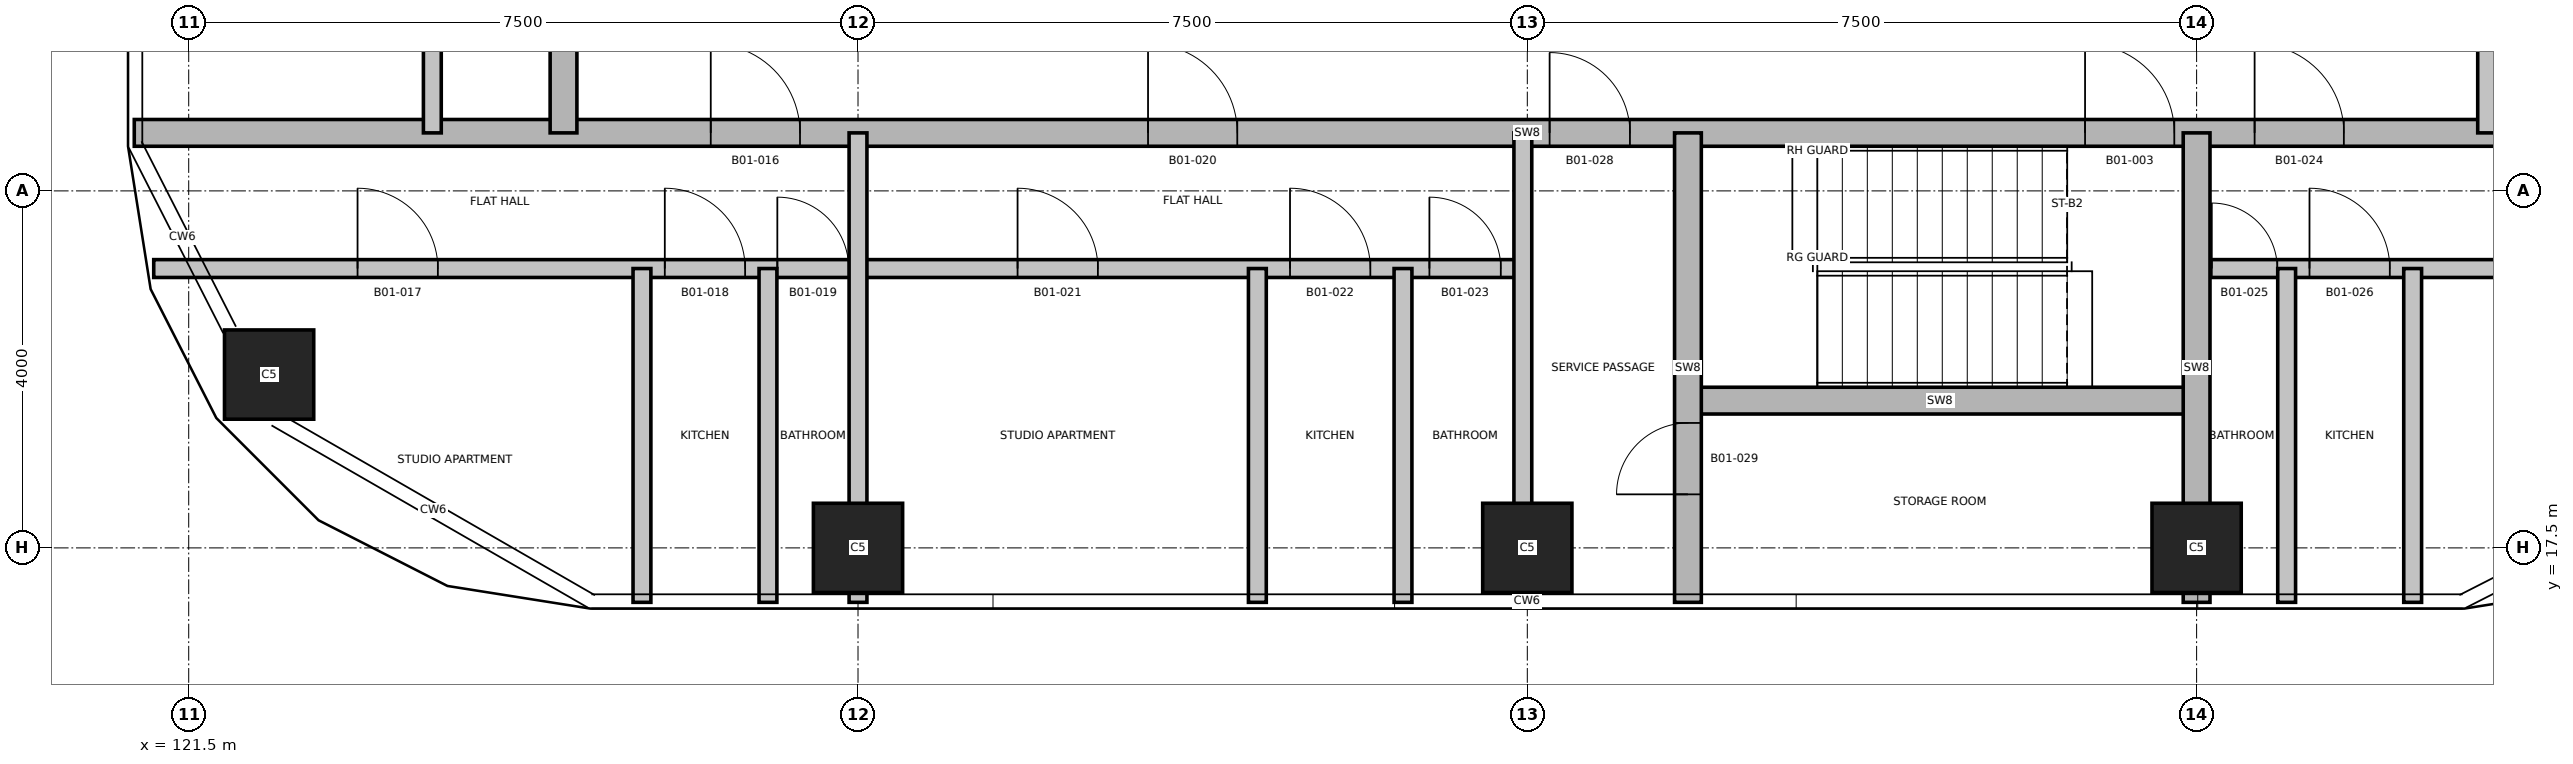
"""IFC4 building model, lengths in metres.
Left out: names, types, materials, properties, quantities, classifications, styles, units other than length and angle.
Written with IfcOpenShell. Run it as: python <this file> out.ifc"""

import sys

from ifc_helpers import new_model, si_unit, direction, frame, frame_2d, origin, origin_2d, place, context, subcontext, project, spatial, rectangle, extrude, element, fill, save


model = new_model("IFC4")
c1 = context("Model", 3, precision=1e-05, world=origin(), true_north=direction((0.0, 1.0)))
c2 = subcontext(c1, "Body", "Model", "MODEL_VIEW")
j1 = project(units=[si_unit("LENGTHUNIT", "METRE"), si_unit("PLANEANGLEUNIT", "RADIAN")], contexts=[c1])
p1 = place(None, origin())
s1 = spatial("IfcSite", under=j1, at=p1, CompositionType="ELEMENT")
p2 = place(p1, origin())
s2 = spatial("IfcBuilding", under=s1, at=p2, CompositionType="ELEMENT")
p3 = place(p2, frame((0.0, 0.0, 37.2)))
s3 = spatial("IfcBuildingStorey", under=s2, at=p3, CompositionType="ELEMENT", Elevation=37.2)
for number, where, z_axis, x_axis in (
    (1, (129.0, 17.5, 0.0), (0.0, 0.0, 1.0), (1.0, 0.0, 0.0)),
    (2, (136.5, 17.5, 0.0), (0.0, 0.0, 1.0), (1.0, 0.0, 0.0)),
    (3, (144.0, 17.5, 0.0), (0.0, 0.0, 1.0), (1.0, 0.0, 0.0)),
    (4, (122.401, 19.442, 0.0), (0.0, 0.0, 1.0), (1.0, 0.0, 0.0)),
):
    element("IfcColumn", number, at=place(p3, frame(where, z_axis=z_axis, x_axis=x_axis)), inside=s3, PredefinedType="COLUMN", context=c2, shape_type="SweptSolid", body=[
        extrude(rectangle(XDim=1.0, YDim=1.0, at=origin_2d()), origin(), (0.0, 0.0, 1.0), 3.7),
    ])
p4 = place(p3, frame((138.25, 19.15, 0.0), z_axis=(0.0, 0.0, 1.0), x_axis=(1.0, 0.0, 0.0)))
e5 = element("IfcWall", 5, at=p4, inside=s3, PredefinedType="SHEAR", context=c2, shape_type="SweptSolid", body=[
    extrude(rectangle(XDim=5.75, YDim=0.3, at=frame_2d((2.875, 0.0))), origin(), (0.0, 0.0, 1.0), 3.4),
])
p5 = place(p3, frame((121.108, 20.63, 0.0), z_axis=(0.0, 0.0, 1.0), x_axis=(1.0, 0.0, 0.0)))
e6 = element("IfcWall", 6, at=p5, inside=s3, PredefinedType="PARTITIONING", context=c2, shape_type="SweptSolid", body=[
    extrude(rectangle(XDim=15.392, YDim=0.2, at=frame_2d((7.696, 0.0))), origin(), (0.0, 0.0, 1.0), 3.4),
])
p6 = place(p5, frame((2.284, 0.0, 0.0)))
e7 = element("IfcOpeningElement", 7, at=p6, cuts=e6, PredefinedType="OPENING", context=c2, shape_type="SweptSolid", body=[
    extrude(rectangle(XDim=0.9, YDim=2.1, at=frame_2d((0.45, 1.05))), frame((0.0, 0.11, 0.0), z_axis=(0.0, -1.0, 0.0), x_axis=(1.0, 0.0, 0.0)), (0.0, 0.0, 1.0), 0.22),
])
p7 = place(p5, frame((5.727, 0.0, 0.0)))
e8 = element("IfcOpeningElement", 8, at=p7, cuts=e6, PredefinedType="OPENING", context=c2, shape_type="SweptSolid", body=[
    extrude(rectangle(XDim=0.9, YDim=2.1, at=frame_2d((0.45, 1.05))), frame((0.0, 0.11, 0.0), z_axis=(0.0, -1.0, 0.0), x_axis=(1.0, 0.0, 0.0)), (0.0, 0.0, 1.0), 0.22),
])
p8 = place(p5, frame((6.988, 0.0, 0.0)))
e9 = element("IfcOpeningElement", 9, at=p8, cuts=e6, PredefinedType="OPENING", context=c2, shape_type="SweptSolid", body=[
    extrude(rectangle(XDim=0.8, YDim=2.1, at=frame_2d((0.4, 1.05))), frame((0.0, 0.11, 0.0), z_axis=(0.0, -1.0, 0.0), x_axis=(1.0, 0.0, 0.0)), (0.0, 0.0, 1.0), 0.22),
])
p9 = place(p5, frame((9.68, 0.0, 0.0)))
e10 = element("IfcOpeningElement", 10, at=p9, cuts=e6, PredefinedType="OPENING", context=c2, shape_type="SweptSolid", body=[
    extrude(rectangle(XDim=0.9, YDim=2.1, at=frame_2d((0.45, 1.05))), frame((0.0, 0.11, 0.0), z_axis=(0.0, -1.0, 0.0), x_axis=(1.0, 0.0, 0.0)), (0.0, 0.0, 1.0), 0.22),
])
p10 = place(p5, frame((12.733, 0.0, 0.0)))
e11 = element("IfcOpeningElement", 11, at=p10, cuts=e6, PredefinedType="OPENING", context=c2, shape_type="SweptSolid", body=[
    extrude(rectangle(XDim=0.9, YDim=2.1, at=frame_2d((0.45, 1.05))), frame((0.0, 0.11, 0.0), z_axis=(0.0, -1.0, 0.0), x_axis=(1.0, 0.0, 0.0)), (0.0, 0.0, 1.0), 0.22),
])
p11 = place(p5, frame((14.295, 0.0, 0.0)))
e12 = element("IfcOpeningElement", 12, at=p11, cuts=e6, PredefinedType="OPENING", context=c2, shape_type="SweptSolid", body=[
    extrude(rectangle(XDim=0.8, YDim=2.1, at=frame_2d((0.4, 1.05))), frame((0.0, 0.11, 0.0), z_axis=(0.0, -1.0, 0.0), x_axis=(1.0, 0.0, 0.0)), (0.0, 0.0, 1.0), 0.22),
])
p12 = place(p3, frame((144.0, 20.63, 0.0), z_axis=(0.0, 0.0, 1.0), x_axis=(1.0, 0.0, 0.0)))
e13 = element("IfcWall", 13, at=p12, inside=s3, PredefinedType="PARTITIONING", context=c2, shape_type="SweptSolid", body=[
    extrude(rectangle(XDim=7.892, YDim=0.2, at=frame_2d((3.946, 0.0))), origin(), (0.0, 0.0, 1.0), 3.4),
])
p13 = place(p12, frame((0.17, 0.0, 0.0)))
e14 = element("IfcOpeningElement", 14, at=p13, cuts=e13, PredefinedType="OPENING", context=c2, shape_type="SweptSolid", body=[
    extrude(rectangle(XDim=0.734, YDim=2.1, at=frame_2d((0.367, 1.05))), frame((0.0, 0.11, 0.0), z_axis=(0.0, -1.0, 0.0), x_axis=(1.0, 0.0, 0.0)), (0.0, 0.0, 1.0), 0.22),
])
p14 = place(p12, frame((1.265, 0.0, 0.0)))
e15 = element("IfcOpeningElement", 15, at=p14, cuts=e13, PredefinedType="OPENING", context=c2, shape_type="SweptSolid", body=[
    extrude(rectangle(XDim=0.9, YDim=2.1, at=frame_2d((0.45, 1.05))), frame((0.0, 0.11, 0.0), z_axis=(0.0, -1.0, 0.0), x_axis=(1.0, 0.0, 0.0)), (0.0, 0.0, 1.0), 0.22),
])
p15 = place(p12, frame((4.708, 0.0, 0.0)))
e16 = element("IfcOpeningElement", 16, at=p15, cuts=e13, PredefinedType="OPENING", context=c2, shape_type="SweptSolid", body=[
    extrude(rectangle(XDim=0.9, YDim=2.1, at=frame_2d((0.45, 1.05))), frame((0.0, 0.11, 0.0), z_axis=(0.0, -1.0, 0.0), x_axis=(1.0, 0.0, 0.0)), (0.0, 0.0, 1.0), 0.22),
])
p16 = place(p3, frame((120.89, 22.15, 0.0), z_axis=(0.0, 0.0, 1.0), x_axis=(1.0, 0.0, 0.0)))
e17 = element("IfcWall", 17, at=p16, inside=s3, PredefinedType="SHEAR", context=c2, shape_type="SweptSolid", body=[
    extrude(rectangle(XDim=31.22, YDim=0.3, at=frame_2d((15.61, 0.0))), origin(), (0.0, 0.0, 1.0), 3.4),
])
p17 = place(p16, frame((21.86, 0.0, 0.0)))
e18 = element("IfcOpeningElement", 18, at=p17, cuts=e17, PredefinedType="OPENING", context=c2, shape_type="SweptSolid", body=[
    extrude(rectangle(XDim=1.0, YDim=2.1, at=frame_2d((0.5, 1.05))), frame((0.0, 0.16, 0.0), z_axis=(0.0, -1.0, 0.0), x_axis=(1.0, 0.0, 0.0)), (0.0, 0.0, 1.0), 0.32),
])
p18 = place(p16, frame((6.46, 0.0, 0.0)))
e19 = element("IfcOpeningElement", 19, at=p18, cuts=e17, PredefinedType="OPENING", context=c2, shape_type="SweptSolid", body=[
    extrude(rectangle(XDim=1.0, YDim=2.1, at=frame_2d((0.5, 1.05))), frame((0.0, 0.16, 0.0), z_axis=(0.0, -1.0, 0.0), x_axis=(1.0, 0.0, 0.0)), (0.0, 0.0, 1.0), 0.32),
])
p19 = place(p16, frame((11.36, 0.0, 0.0)))
e20 = element("IfcOpeningElement", 20, at=p19, cuts=e17, PredefinedType="OPENING", context=c2, shape_type="SweptSolid", body=[
    extrude(rectangle(XDim=1.0, YDim=2.1, at=frame_2d((0.5, 1.05))), frame((0.0, 0.16, 0.0), z_axis=(0.0, -1.0, 0.0), x_axis=(1.0, 0.0, 0.0)), (0.0, 0.0, 1.0), 0.32),
])
p20 = place(p16, frame((23.76, 0.0, 0.0)))
e21 = element("IfcOpeningElement", 21, at=p20, cuts=e17, PredefinedType="OPENING", context=c2, shape_type="SweptSolid", body=[
    extrude(rectangle(XDim=1.0, YDim=2.1, at=frame_2d((0.5, 1.05))), frame((0.0, 0.16, 0.0), z_axis=(0.0, -1.0, 0.0), x_axis=(1.0, 0.0, 0.0)), (0.0, 0.0, 1.0), 0.32),
])
p21 = place(p16, frame((15.86, 0.0, 0.0)))
e22 = element("IfcOpeningElement", 22, at=p21, cuts=e17, PredefinedType="OPENING", context=c2, shape_type="SweptSolid", body=[
    extrude(rectangle(XDim=0.9, YDim=2.1, at=frame_2d((0.45, 1.05))), frame((0.0, 0.16, 0.0), z_axis=(0.0, -1.0, 0.0), x_axis=(1.0, 0.0, 0.0)), (0.0, 0.0, 1.0), 0.32),
])
p22 = place(p3, frame((124.23, 22.15, 0.0), z_axis=(0.0, 0.0, 1.0), x_axis=(0.0, 1.0, 0.0)))
e23 = element("IfcWall", 23, at=p22, inside=s3, PredefinedType="PARTITIONING", context=c2, shape_type="SweptSolid", body=[
    extrude(rectangle(XDim=17.7, YDim=0.2, at=frame_2d((8.85, 0.0))), origin(), (0.0, 0.0, 1.0), 3.4),
])
p23 = place(p22, frame((1.028, 0.0, 0.0)))
e24 = element("IfcOpeningElement", 24, at=p23, cuts=e23, PredefinedType="OPENING", context=c2, shape_type="SweptSolid", body=[
    extrude(rectangle(XDim=0.9, YDim=2.1, at=frame_2d((0.45, 1.05))), frame((0.0, 0.11, 0.0), z_axis=(0.0, -1.0, 0.0), x_axis=(1.0, 0.0, 0.0)), (0.0, 0.0, 1.0), 0.22),
])
p24 = place(p22, frame((3.253, 0.0, 0.0)))
e25 = element("IfcOpeningElement", 25, at=p24, cuts=e23, PredefinedType="OPENING", context=c2, shape_type="SweptSolid", body=[
    extrude(rectangle(XDim=0.8, YDim=2.1, at=frame_2d((0.4, 1.05))), frame((0.0, 0.11, 0.0), z_axis=(0.0, -1.0, 0.0), x_axis=(1.0, 0.0, 0.0)), (0.0, 0.0, 1.0), 0.22),
])
p25 = place(p22, frame((6.867, 0.0, 0.0)))
e26 = element("IfcOpeningElement", 26, at=p25, cuts=e23, PredefinedType="OPENING", context=c2, shape_type="SweptSolid", body=[
    extrude(rectangle(XDim=0.9, YDim=2.1, at=frame_2d((0.45, 1.05))), frame((0.0, 0.11, 0.0), z_axis=(0.0, -1.0, 0.0), x_axis=(1.0, 0.0, 0.0)), (0.0, 0.0, 1.0), 0.22),
])
p26 = place(p22, frame((11.367, 0.0, 0.0)))
e27 = element("IfcOpeningElement", 27, at=p26, cuts=e23, PredefinedType="OPENING", context=c2, shape_type="SweptSolid", body=[
    extrude(rectangle(XDim=0.9, YDim=2.1, at=frame_2d((0.45, 1.05))), frame((0.0, 0.11, 0.0), z_axis=(0.0, -1.0, 0.0), x_axis=(1.0, 0.0, 0.0)), (0.0, 0.0, 1.0), 0.22),
])
p27 = place(p22, frame((15.075, 0.0, 0.0)))
e28 = element("IfcOpeningElement", 28, at=p27, cuts=e23, PredefinedType="OPENING", context=c2, shape_type="SweptSolid", body=[
    extrude(rectangle(XDim=0.9, YDim=2.1, at=frame_2d((0.45, 1.05))), frame((0.0, 0.11, 0.0), z_axis=(0.0, -1.0, 0.0), x_axis=(1.0, 0.0, 0.0)), (0.0, 0.0, 1.0), 0.22),
])
p28 = place(p3, frame((125.7, 22.15, 0.0), z_axis=(0.0, 0.0, 1.0), x_axis=(0.0, 1.0, 0.0)))
e29 = element("IfcWall", 29, at=p28, inside=s3, PredefinedType="SHEAR", context=c2, shape_type="SweptSolid", body=[
    extrude(rectangle(XDim=17.7, YDim=0.3, at=frame_2d((8.85, 0.0))), origin(), (0.0, 0.0, 1.0), 3.4),
])
p29 = place(p28, frame((2.7, 0.0, 0.0)))
e30 = element("IfcOpeningElement", 30, at=p29, cuts=e29, PredefinedType="OPENING", context=c2, shape_type="SweptSolid", body=[
    extrude(rectangle(XDim=1.0, YDim=2.1, at=frame_2d((0.5, 1.05))), frame((0.0, 0.16, 0.0), z_axis=(0.0, -1.0, 0.0), x_axis=(1.0, 0.0, 0.0)), (0.0, 0.0, 1.0), 0.32),
])
for number, where, z_axis, x_axis in (
    (31, (126.579, 16.89, 0.0), (0.0, 0.0, 1.0), (0.0, 1.0, 0.0)),
    (32, (127.991, 16.89, 0.0), (0.0, 0.0, 1.0), (0.0, 1.0, 0.0)),
):
    element("IfcWall", number, at=place(p3, frame(where, z_axis=z_axis, x_axis=x_axis)), inside=s3, PredefinedType="PARTITIONING", context=c2, shape_type="SweptSolid", body=[
        extrude(rectangle(XDim=3.74, YDim=0.2, at=frame_2d((1.87, 0.0))), origin(), (0.0, 0.0, 1.0), 3.4),
    ])
p30 = place(p3, frame((129.0, 16.89, 0.0), z_axis=(0.0, 0.0, 1.0), x_axis=(0.0, 1.0, 0.0)))
e33 = element("IfcWall", 33, at=p30, inside=s3, PredefinedType="PARTITIONING", context=c2, shape_type="SweptSolid", body=[
    extrude(rectangle(XDim=5.26, YDim=0.2, at=frame_2d((2.63, 0.0))), origin(), (0.0, 0.0, 1.0), 3.4),
])
for number, where, z_axis, x_axis in (
    (34, (133.475, 16.89, 0.0), (0.0, 0.0, 1.0), (0.0, 1.0, 0.0)),
    (35, (135.107, 16.89, 0.0), (0.0, 0.0, 1.0), (0.0, 1.0, 0.0)),
):
    element("IfcWall", number, at=place(p3, frame(where, z_axis=z_axis, x_axis=x_axis)), inside=s3, PredefinedType="PARTITIONING", context=c2, shape_type="SweptSolid", body=[
        extrude(rectangle(XDim=3.74, YDim=0.2, at=frame_2d((1.87, 0.0))), origin(), (0.0, 0.0, 1.0), 3.4),
    ])
p31 = place(p3, frame((136.45, 16.89, 0.0), z_axis=(0.0, 0.0, 1.0), x_axis=(0.0, 1.0, 0.0)))
e36 = element("IfcWall", 36, at=p31, inside=s3, PredefinedType="PARTITIONING", context=c2, shape_type="SweptSolid", body=[
    extrude(rectangle(XDim=5.26, YDim=0.2, at=frame_2d((2.63, 0.0))), origin(), (0.0, 0.0, 1.0), 3.4),
])
p32 = place(p3, frame((138.3, 16.89, 0.0), z_axis=(0.0, 0.0, 1.0), x_axis=(0.0, 1.0, 0.0)))
e37 = element("IfcWall", 37, at=p32, inside=s3, PredefinedType="SHEAR", context=c2, shape_type="SweptSolid", body=[
    extrude(rectangle(XDim=5.26, YDim=0.3, at=frame_2d((2.63, 0.0))), origin(), (0.0, 0.0, 1.0), 3.4),
])
p33 = place(p32, frame((1.21, 0.0, 0.0)))
e38 = element("IfcOpeningElement", 38, at=p33, cuts=e37, PredefinedType="OPENING", context=c2, shape_type="SweptSolid", body=[
    extrude(rectangle(XDim=0.8, YDim=2.1, at=frame_2d((0.4, 1.05))), frame((0.0, 0.16, 0.0), z_axis=(0.0, -1.0, 0.0), x_axis=(1.0, 0.0, 0.0)), (0.0, 0.0, 1.0), 0.32),
])
p34 = place(p3, frame((144.0, 16.89, 0.0), z_axis=(0.0, 0.0, 1.0), x_axis=(0.0, 1.0, 0.0)))
e39 = element("IfcWall", 39, at=p34, inside=s3, PredefinedType="SHEAR", context=c2, shape_type="SweptSolid", body=[
    extrude(rectangle(XDim=5.26, YDim=0.3, at=frame_2d((2.63, 0.0))), origin(), (0.0, 0.0, 1.0), 3.4),
])
for number, where, z_axis, x_axis in (
    (40, (145.009, 16.89, 0.0), (0.0, 0.0, 1.0), (0.0, 1.0, 0.0)),
    (41, (146.421, 16.89, 0.0), (0.0, 0.0, 1.0), (0.0, 1.0, 0.0)),
):
    element("IfcWall", number, at=place(p3, frame(where, z_axis=z_axis, x_axis=x_axis)), inside=s3, PredefinedType="PARTITIONING", context=c2, shape_type="SweptSolid", body=[
        extrude(rectangle(XDim=3.74, YDim=0.2, at=frame_2d((1.87, 0.0))), origin(), (0.0, 0.0, 1.0), 3.4),
    ])
p35 = place(p3, frame((147.25, 22.15, 0.0), z_axis=(0.0, 0.0, 1.0), x_axis=(0.0, 1.0, 0.0)))
e42 = element("IfcWall", 42, at=p35, inside=s3, PredefinedType="PARTITIONING", context=c2, shape_type="SweptSolid", body=[
    extrude(rectangle(XDim=17.7, YDim=0.2, at=frame_2d((8.85, 0.0))), origin(), (0.0, 0.0, 1.0), 3.4),
])
p36 = place(p35, frame((2.65, 0.0, 0.0)))
e43 = element("IfcOpeningElement", 43, at=p36, cuts=e42, PredefinedType="OPENING", context=c2, shape_type="SweptSolid", body=[
    extrude(rectangle(XDim=1.0, YDim=2.1, at=frame_2d((0.5, 1.05))), frame((0.0, 0.11, 0.0), z_axis=(0.0, -1.0, 0.0), x_axis=(1.0, 0.0, 0.0)), (0.0, 0.0, 1.0), 0.22),
])
p37 = place(p17, origin())
e44 = element("IfcDoor", 44, at=p37, inside=s3, OperationType="SINGLE_SWING_LEFT", PredefinedType="DOOR", context=c2, shape_type="SweptSolid", body=[
    extrude(rectangle(XDim=1.0, YDim=2.1, at=frame_2d((0.5, 1.05))), frame((0.0, 0.025, 0.0), z_axis=(0.0, -1.0, 0.0), x_axis=(1.0, 0.0, 0.0)), (0.0, 0.0, 1.0), 0.05),
])
fill(e18, e44)
p38 = place(p18, origin())
e45 = element("IfcDoor", 45, at=p38, inside=s3, OperationType="SINGLE_SWING_RIGHT", PredefinedType="DOOR", context=c2, shape_type="SweptSolid", body=[
    extrude(rectangle(XDim=1.0, YDim=2.1, at=frame_2d((0.5, 1.05))), frame((0.0, 0.025, 0.0), z_axis=(0.0, -1.0, 0.0), x_axis=(1.0, 0.0, 0.0)), (0.0, 0.0, 1.0), 0.05),
])
fill(e19, e45)
p39 = place(p6, origin())
e46 = element("IfcDoor", 46, at=p39, inside=s3, OperationType="SINGLE_SWING_LEFT", PredefinedType="DOOR", context=c2, shape_type="SweptSolid", body=[
    extrude(rectangle(XDim=0.9, YDim=2.1, at=frame_2d((0.45, 1.05))), frame((0.0, 0.025, 0.0), z_axis=(0.0, -1.0, 0.0), x_axis=(1.0, 0.0, 0.0)), (0.0, 0.0, 1.0), 0.05),
])
fill(e7, e46)
p40 = place(p7, origin())
e47 = element("IfcDoor", 47, at=p40, inside=s3, OperationType="SINGLE_SWING_RIGHT", PredefinedType="DOOR", context=c2, shape_type="SweptSolid", body=[
    extrude(rectangle(XDim=0.9, YDim=2.1, at=frame_2d((0.45, 1.05))), frame((0.0, 0.025, 0.0), z_axis=(0.0, -1.0, 0.0), x_axis=(1.0, 0.0, 0.0)), (0.0, 0.0, 1.0), 0.05),
])
fill(e8, e47)
p41 = place(p8, origin())
e48 = element("IfcDoor", 48, at=p41, inside=s3, OperationType="SINGLE_SWING_LEFT", PredefinedType="DOOR", context=c2, shape_type="SweptSolid", body=[
    extrude(rectangle(XDim=0.8, YDim=2.1, at=frame_2d((0.4, 1.05))), frame((0.0, 0.025, 0.0), z_axis=(0.0, -1.0, 0.0), x_axis=(1.0, 0.0, 0.0)), (0.0, 0.0, 1.0), 0.05),
])
fill(e9, e48)
p42 = place(p19, origin())
e49 = element("IfcDoor", 49, at=p42, inside=s3, OperationType="SINGLE_SWING_RIGHT", PredefinedType="DOOR", context=c2, shape_type="SweptSolid", body=[
    extrude(rectangle(XDim=1.0, YDim=2.1, at=frame_2d((0.5, 1.05))), frame((0.0, 0.025, 0.0), z_axis=(0.0, -1.0, 0.0), x_axis=(1.0, 0.0, 0.0)), (0.0, 0.0, 1.0), 0.05),
])
fill(e20, e49)
p43 = place(p9, origin())
e50 = element("IfcDoor", 50, at=p43, inside=s3, OperationType="SINGLE_SWING_LEFT", PredefinedType="DOOR", context=c2, shape_type="SweptSolid", body=[
    extrude(rectangle(XDim=0.9, YDim=2.1, at=frame_2d((0.45, 1.05))), frame((0.0, 0.025, 0.0), z_axis=(0.0, -1.0, 0.0), x_axis=(1.0, 0.0, 0.0)), (0.0, 0.0, 1.0), 0.05),
])
fill(e10, e50)
p44 = place(p10, origin())
e51 = element("IfcDoor", 51, at=p44, inside=s3, OperationType="SINGLE_SWING_RIGHT", PredefinedType="DOOR", context=c2, shape_type="SweptSolid", body=[
    extrude(rectangle(XDim=0.9, YDim=2.1, at=frame_2d((0.45, 1.05))), frame((0.0, 0.025, 0.0), z_axis=(0.0, -1.0, 0.0), x_axis=(1.0, 0.0, 0.0)), (0.0, 0.0, 1.0), 0.05),
])
fill(e11, e51)
p45 = place(p11, origin())
e52 = element("IfcDoor", 52, at=p45, inside=s3, OperationType="SINGLE_SWING_LEFT", PredefinedType="DOOR", context=c2, shape_type="SweptSolid", body=[
    extrude(rectangle(XDim=0.8, YDim=2.1, at=frame_2d((0.4, 1.05))), frame((0.0, 0.025, 0.0), z_axis=(0.0, -1.0, 0.0), x_axis=(1.0, 0.0, 0.0)), (0.0, 0.0, 1.0), 0.05),
])
fill(e12, e52)
p46 = place(p20, origin())
e53 = element("IfcDoor", 53, at=p46, inside=s3, OperationType="SINGLE_SWING_RIGHT", PredefinedType="DOOR", context=c2, shape_type="SweptSolid", body=[
    extrude(rectangle(XDim=1.0, YDim=2.1, at=frame_2d((0.5, 1.05))), frame((0.0, 0.025, 0.0), z_axis=(0.0, -1.0, 0.0), x_axis=(1.0, 0.0, 0.0)), (0.0, 0.0, 1.0), 0.05),
])
fill(e21, e53)
p47 = place(p13, origin())
e54 = element("IfcDoor", 54, at=p47, inside=s3, OperationType="SINGLE_SWING_LEFT", PredefinedType="DOOR", context=c2, shape_type="SweptSolid", body=[
    extrude(rectangle(XDim=0.734, YDim=2.1, at=frame_2d((0.367, 1.05))), frame((0.0, 0.025, 0.0), z_axis=(0.0, -1.0, 0.0), x_axis=(1.0, 0.0, 0.0)), (0.0, 0.0, 1.0), 0.05),
])
fill(e14, e54)
p48 = place(p14, origin())
e55 = element("IfcDoor", 55, at=p48, inside=s3, OperationType="SINGLE_SWING_RIGHT", PredefinedType="DOOR", context=c2, shape_type="SweptSolid", body=[
    extrude(rectangle(XDim=0.9, YDim=2.1, at=frame_2d((0.45, 1.05))), frame((0.0, 0.025, 0.0), z_axis=(0.0, -1.0, 0.0), x_axis=(1.0, 0.0, 0.0)), (0.0, 0.0, 1.0), 0.05),
])
fill(e15, e55)
p49 = place(p21, origin())
e56 = element("IfcDoor", 56, at=p49, inside=s3, OperationType="SINGLE_SWING_RIGHT", PredefinedType="DOOR", context=c2, shape_type="SweptSolid", body=[
    extrude(rectangle(XDim=0.9, YDim=2.1, at=frame_2d((0.45, 1.05))), frame((0.0, 0.025, 0.0), z_axis=(0.0, -1.0, 0.0), x_axis=(1.0, 0.0, 0.0)), (0.0, 0.0, 1.0), 0.05),
])
fill(e22, e56)
p50 = place(p33, origin())
e57 = element("IfcDoor", 57, at=p50, inside=s3, OperationType="SINGLE_SWING_LEFT", PredefinedType="DOOR", context=c2, shape_type="SweptSolid", body=[
    extrude(rectangle(XDim=0.8, YDim=2.1, at=frame_2d((0.4, 1.05))), frame((0.0, 0.025, 0.0), z_axis=(0.0, -1.0, 0.0), x_axis=(1.0, 0.0, 0.0)), (0.0, 0.0, 1.0), 0.05),
])
fill(e38, e57)
save(model, sys.argv[1])
